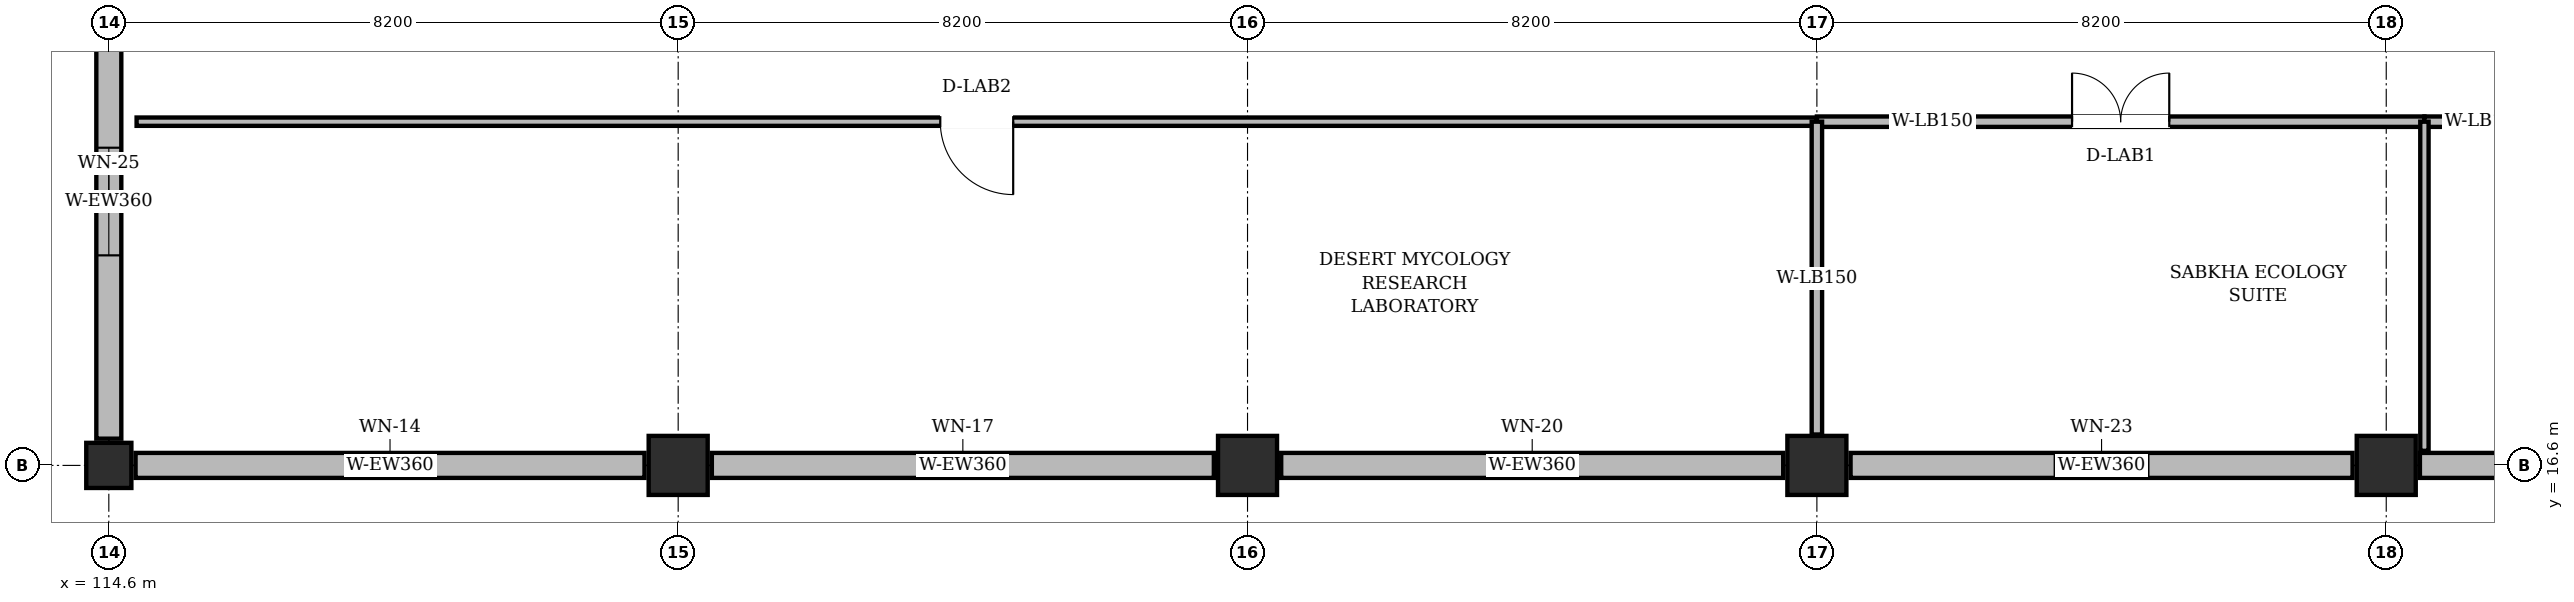
"""IFC4 building model, lengths in metres.
Left out: names, types, materials, properties, quantities, classifications, styles, units other than length and angle.
Written with IfcOpenShell. Run it as: python <this file> out.ifc"""

import sys

from ifc_helpers import new_model, si_unit, direction, frame, frame_2d, origin, origin_2d, place, context, subcontext, project, spatial, rectangle, extrude, element, fill, save


model = new_model("IFC4")
c1 = context("Model", 3, precision=1e-05, world=origin(), true_north=direction((0.0, 1.0)))
c2 = subcontext(c1, "Body", "Model", "MODEL_VIEW")
j1 = project(units=[si_unit("LENGTHUNIT", "METRE"), si_unit("PLANEANGLEUNIT", "RADIAN")], contexts=[c1])
p1 = place(None, origin())
s1 = spatial("IfcSite", under=j1, at=p1, CompositionType="ELEMENT")
p2 = place(p1, origin())
s2 = spatial("IfcBuilding", under=s1, at=p2, CompositionType="ELEMENT")
p3 = place(p2, frame((0.0, 0.0, 24.0)))
s3 = spatial("IfcBuildingStorey", under=s2, at=p3, CompositionType="ELEMENT", Elevation=24.0)
p4 = place(p3, frame((114.6, 16.6, 0.0), z_axis=(0.0, 0.0, 1.0), x_axis=(1.0, 0.0, 0.0)))
e1 = element("IfcColumn", 1, at=p4, inside=s3, PredefinedType="COLUMN", context=c2, shape_type="SweptSolid", body=[
    extrude(rectangle(XDim=0.65, YDim=0.65, at=origin_2d()), origin(), (0.0, 0.0, 1.0), 3.93),
])
for number, where, z_axis, x_axis in (
    (2, (122.8, 16.6, 0.0), (0.0, 0.0, 1.0), (1.0, 0.0, 0.0)),
    (3, (131.0, 16.6, 0.0), (0.0, 0.0, 1.0), (1.0, 0.0, 0.0)),
    (4, (139.2, 16.6, 0.0), (0.0, 0.0, 1.0), (1.0, 0.0, 0.0)),
    (5, (147.4, 16.6, 0.0), (0.0, 0.0, 1.0), (1.0, 0.0, 0.0)),
):
    element("IfcColumn", number, at=place(p3, frame(where, z_axis=z_axis, x_axis=x_axis)), inside=s3, PredefinedType="COLUMN", context=c2, shape_type="SweptSolid", body=[
        extrude(rectangle(XDim=0.85, YDim=0.85, at=origin_2d()), origin(), (0.0, 0.0, 1.0), 3.93),
    ])
p5 = place(p3, frame((114.985, 16.6, 0.0), z_axis=(0.0, 0.0, 1.0), x_axis=(1.0, 0.0, 0.0)))
e6 = element("IfcWall", 6, at=p5, inside=s3, PredefinedType="SOLIDWALL", context=c2, shape_type="SweptSolid", body=[
    extrude(rectangle(XDim=7.33, YDim=0.36, at=frame_2d((3.665, 0.0))), origin(), (0.0, 0.0, 1.0), 3.315),
])
p6 = place(p5, frame((3.19, 0.0, 0.95)))
e7 = element("IfcOpeningElement", 7, at=p6, cuts=e6, PredefinedType="OPENING", context=c2, shape_type="SweptSolid", body=[
    extrude(rectangle(XDim=0.95, YDim=1.5, at=frame_2d((0.475, 0.75))), frame((0.0, 0.192, 0.0), z_axis=(0.0, -1.0, 0.0), x_axis=(1.0, 0.0, 0.0)), (0.0, 0.0, 1.0), 0.384),
])
p7 = place(p3, frame((123.285, 16.6, 0.0), z_axis=(0.0, 0.0, 1.0), x_axis=(1.0, 0.0, 0.0)))
e8 = element("IfcWall", 8, at=p7, inside=s3, PredefinedType="SOLIDWALL", context=c2, shape_type="SweptSolid", body=[
    extrude(rectangle(XDim=7.23, YDim=0.36, at=frame_2d((3.615, 0.0))), origin(), (0.0, 0.0, 1.0), 3.315),
])
p8 = place(p7, frame((3.04, 0.0, 0.95)))
e9 = element("IfcOpeningElement", 9, at=p8, cuts=e8, PredefinedType="OPENING", context=c2, shape_type="SweptSolid", body=[
    extrude(rectangle(XDim=1.15, YDim=1.25, at=frame_2d((0.575, 0.625))), frame((0.0, 0.192, 0.0), z_axis=(0.0, -1.0, 0.0), x_axis=(1.0, 0.0, 0.0)), (0.0, 0.0, 1.0), 0.384),
])
p9 = place(p3, frame((131.485, 16.6, 0.0), z_axis=(0.0, 0.0, 1.0), x_axis=(1.0, 0.0, 0.0)))
e10 = element("IfcWall", 10, at=p9, inside=s3, PredefinedType="SOLIDWALL", context=c2, shape_type="SweptSolid", body=[
    extrude(rectangle(XDim=7.23, YDim=0.36, at=frame_2d((3.615, 0.0))), origin(), (0.0, 0.0, 1.0), 3.315),
])
p10 = place(p9, frame((3.04, 0.0, 0.95)))
e11 = element("IfcOpeningElement", 11, at=p10, cuts=e10, PredefinedType="OPENING", context=c2, shape_type="SweptSolid", body=[
    extrude(rectangle(XDim=1.15, YDim=2.05, at=frame_2d((0.575, 1.025))), frame((0.0, 0.192, 0.0), z_axis=(0.0, -1.0, 0.0), x_axis=(1.0, 0.0, 0.0)), (0.0, 0.0, 1.0), 0.384),
])
p11 = place(p3, frame((139.685, 16.6, 0.0), z_axis=(0.0, 0.0, 1.0), x_axis=(1.0, 0.0, 0.0)))
e12 = element("IfcWall", 12, at=p11, inside=s3, PredefinedType="SOLIDWALL", context=c2, shape_type="SweptSolid", body=[
    extrude(rectangle(XDim=7.23, YDim=0.36, at=frame_2d((3.615, 0.0))), origin(), (0.0, 0.0, 1.0), 3.315),
])
p12 = place(p11, frame((2.94, 0.0, 0.95)))
e13 = element("IfcOpeningElement", 13, at=p12, cuts=e12, PredefinedType="OPENING", context=c2, shape_type="SweptSolid", body=[
    extrude(rectangle(XDim=1.35, YDim=1.75, at=frame_2d((0.675, 0.875))), frame((0.0, 0.192, 0.0), z_axis=(0.0, -1.0, 0.0), x_axis=(1.0, 0.0, 0.0)), (0.0, 0.0, 1.0), 0.384),
])
p13 = place(p3, frame((147.885, 16.6, 0.0), z_axis=(0.0, 0.0, 1.0), x_axis=(1.0, 0.0, 0.0)))
e14 = element("IfcWall", 14, at=p13, inside=s3, PredefinedType="SOLIDWALL", context=c2, shape_type="SweptSolid", body=[
    extrude(rectangle(XDim=7.23, YDim=0.36, at=frame_2d((3.615, 0.0))), origin(), (0.0, 0.0, 1.0), 3.315),
])
p14 = place(p13, frame((2.84, 0.0, 0.95)))
e15 = element("IfcOpeningElement", 15, at=p14, cuts=e14, PredefinedType="OPENING", context=c2, shape_type="SweptSolid", body=[
    extrude(rectangle(XDim=1.55, YDim=1.5, at=frame_2d((0.775, 0.75))), frame((0.0, 0.192, 0.0), z_axis=(0.0, -1.0, 0.0), x_axis=(1.0, 0.0, 0.0)), (0.0, 0.0, 1.0), 0.384),
])
p15 = place(p3, frame((114.6, 23.815, 0.0), z_axis=(0.0, 0.0, 1.0), x_axis=(0.0, -1.0, 0.0)))
e16 = element("IfcWall", 16, at=p15, inside=s3, PredefinedType="SOLIDWALL", context=c2, shape_type="SweptSolid", body=[
    extrude(rectangle(XDim=6.83, YDim=0.36, at=frame_2d((3.415, 0.0))), origin(), (0.0, 0.0, 1.0), 3.315),
])
p16 = place(p15, frame((2.64, 0.0, 0.95)))
e17 = element("IfcOpeningElement", 17, at=p16, cuts=e16, PredefinedType="OPENING", context=c2, shape_type="SweptSolid", body=[
    extrude(rectangle(XDim=1.55, YDim=1.25, at=frame_2d((0.775, 0.625))), frame((0.0, 0.192, 0.0), z_axis=(0.0, -1.0, 0.0), x_axis=(1.0, 0.0, 0.0)), (0.0, 0.0, 1.0), 0.384),
])
p17 = place(p3, frame((139.2, 21.55, 0.0), z_axis=(0.0, 0.0, 1.0), x_axis=(-1.0, 0.0, 0.0)))
e18 = element("IfcWall", 18, at=p17, inside=s3, PredefinedType="PARTITIONING", context=c2, shape_type="SweptSolid", body=[
    extrude(rectangle(XDim=24.2, YDim=0.12, at=frame_2d((12.1, 0.0))), origin(), (0.0, 0.0, 1.0), 3.575),
])
p18 = place(p17, frame((11.575, 0.0, 0.0)))
e19 = element("IfcOpeningElement", 19, at=p18, cuts=e18, PredefinedType="OPENING", context=c2, shape_type="SweptSolid", body=[
    extrude(rectangle(XDim=1.05, YDim=2.2, at=frame_2d((0.525, 1.1))), frame((0.0, 0.072, 0.0), z_axis=(0.0, -1.0, 0.0), x_axis=(1.0, 0.0, 0.0)), (0.0, 0.0, 1.0), 0.144),
])
p19 = place(p3, frame((147.95, 21.55, 0.0), z_axis=(0.0, 0.0, 1.0), x_axis=(-1.0, 0.0, 0.0)))
e20 = element("IfcWall", 20, at=p19, inside=s3, PredefinedType="PARTITIONING", context=c2, shape_type="SweptSolid", body=[
    extrude(rectangle(XDim=8.75, YDim=0.15, at=frame_2d((4.375, 0.0))), origin(), (0.0, 0.0, 1.0), 3.505),
])
p20 = place(p19, frame((3.675, 0.0, 0.0)))
e21 = element("IfcOpeningElement", 21, at=p20, cuts=e20, PredefinedType="OPENING", context=c2, shape_type="SweptSolid", body=[
    extrude(rectangle(XDim=1.4, YDim=2.2, at=frame_2d((0.7, 1.1))), frame((0.0, 0.087, 0.0), z_axis=(0.0, -1.0, 0.0), x_axis=(1.0, 0.0, 0.0)), (0.0, 0.0, 1.0), 0.174),
])
p21 = place(p3, frame((149.7, 21.55, 0.0), z_axis=(0.0, 0.0, 1.0), x_axis=(-1.0, 0.0, 0.0)))
e22 = element("IfcWall", 22, at=p21, inside=s3, PredefinedType="PARTITIONING", context=c2, shape_type="SweptSolid", body=[
    extrude(rectangle(XDim=1.75, YDim=0.15, at=frame_2d((0.875, 0.0))), origin(), (0.0, 0.0, 1.0), 3.505),
])
p22 = place(p3, frame((139.2, 21.55, 0.0), z_axis=(0.0, 0.0, 1.0), x_axis=(0.0, -1.0, 0.0)))
e23 = element("IfcWall", 23, at=p22, inside=s3, PredefinedType="PARTITIONING", context=c2, shape_type="SweptSolid", body=[
    extrude(rectangle(XDim=4.505, YDim=0.15, at=frame_2d((2.252, 0.0))), origin(), (0.0, 0.0, 1.0), 3.265),
])
p23 = place(p3, frame((147.95, 21.55, 0.0), z_axis=(0.0, 0.0, 1.0), x_axis=(0.0, -1.0, 0.0)))
e24 = element("IfcWall", 24, at=p23, inside=s3, PredefinedType="PARTITIONING", context=c2, shape_type="SweptSolid", body=[
    extrude(rectangle(XDim=4.74, YDim=0.12, at=frame_2d((2.37, 0.0))), origin(), (0.0, 0.0, 1.0), 3.805),
])
p24 = place(p6, origin())
e25 = element("IfcWindow", 25, at=p24, inside=s3, PartitioningType="SINGLE_PANEL", PredefinedType="WINDOW", context=c2, shape_type="SweptSolid", body=[
    extrude(rectangle(XDim=0.95, YDim=1.5, at=frame_2d((0.475, 0.75))), frame((0.0, 0.03, 0.0), z_axis=(0.0, -1.0, 0.0), x_axis=(1.0, 0.0, 0.0)), (0.0, 0.0, 1.0), 0.06),
])
fill(e7, e25)
p25 = place(p8, origin())
e26 = element("IfcWindow", 26, at=p25, inside=s3, PartitioningType="SINGLE_PANEL", PredefinedType="WINDOW", context=c2, shape_type="SweptSolid", body=[
    extrude(rectangle(XDim=1.15, YDim=1.25, at=frame_2d((0.575, 0.625))), frame((0.0, 0.03, 0.0), z_axis=(0.0, -1.0, 0.0), x_axis=(1.0, 0.0, 0.0)), (0.0, 0.0, 1.0), 0.06),
])
fill(e9, e26)
p26 = place(p10, origin())
e27 = element("IfcWindow", 27, at=p26, inside=s3, PartitioningType="SINGLE_PANEL", PredefinedType="WINDOW", context=c2, shape_type="SweptSolid", body=[
    extrude(rectangle(XDim=1.15, YDim=2.05, at=frame_2d((0.575, 1.025))), frame((0.0, 0.03, 0.0), z_axis=(0.0, -1.0, 0.0), x_axis=(1.0, 0.0, 0.0)), (0.0, 0.0, 1.0), 0.06),
])
fill(e11, e27)
p27 = place(p12, origin())
e28 = element("IfcWindow", 28, at=p27, inside=s3, PartitioningType="SINGLE_PANEL", PredefinedType="WINDOW", context=c2, shape_type="SweptSolid", body=[
    extrude(rectangle(XDim=1.35, YDim=1.75, at=frame_2d((0.675, 0.875))), frame((0.0, 0.03, 0.0), z_axis=(0.0, -1.0, 0.0), x_axis=(1.0, 0.0, 0.0)), (0.0, 0.0, 1.0), 0.06),
])
fill(e13, e28)
p28 = place(p16, origin())
e29 = element("IfcWindow", 29, at=p28, inside=s3, PartitioningType="DOUBLE_PANEL_VERTICAL", PredefinedType="WINDOW", context=c2, shape_type="SweptSolid", body=[
    extrude(rectangle(XDim=1.55, YDim=1.25, at=frame_2d((0.775, 0.625))), frame((0.0, 0.03, 0.0), z_axis=(0.0, -1.0, 0.0), x_axis=(1.0, 0.0, 0.0)), (0.0, 0.0, 1.0), 0.06),
])
fill(e17, e29)
p29 = place(p18, origin())
e30 = element("IfcDoor", 30, at=p29, inside=s3, OperationType="SINGLE_SWING_LEFT", PredefinedType="DOOR", context=c2, shape_type="SweptSolid", body=[
    extrude(rectangle(XDim=1.05, YDim=2.2, at=frame_2d((0.525, 1.1))), frame((0.0, 0.025, 0.0), z_axis=(0.0, -1.0, 0.0), x_axis=(1.0, 0.0, 0.0)), (0.0, 0.0, 1.0), 0.05),
])
fill(e19, e30)
p30 = place(p20, frame((1.4, 0.0, 0.0), z_axis=(0.0, 0.0, 1.0), x_axis=(-1.0, 0.0, 0.0)))
e31 = element("IfcDoor", 31, at=p30, inside=s3, OperationType="DOUBLE_DOOR_SINGLE_SWING", PredefinedType="DOOR", context=c2, shape_type="SweptSolid", body=[
    extrude(rectangle(XDim=1.4, YDim=2.2, at=frame_2d((0.7, 1.1))), frame((0.0, 0.025, 0.0), z_axis=(0.0, -1.0, 0.0), x_axis=(1.0, 0.0, 0.0)), (0.0, 0.0, 1.0), 0.05),
])
fill(e21, e31)
save(model, sys.argv[1])
